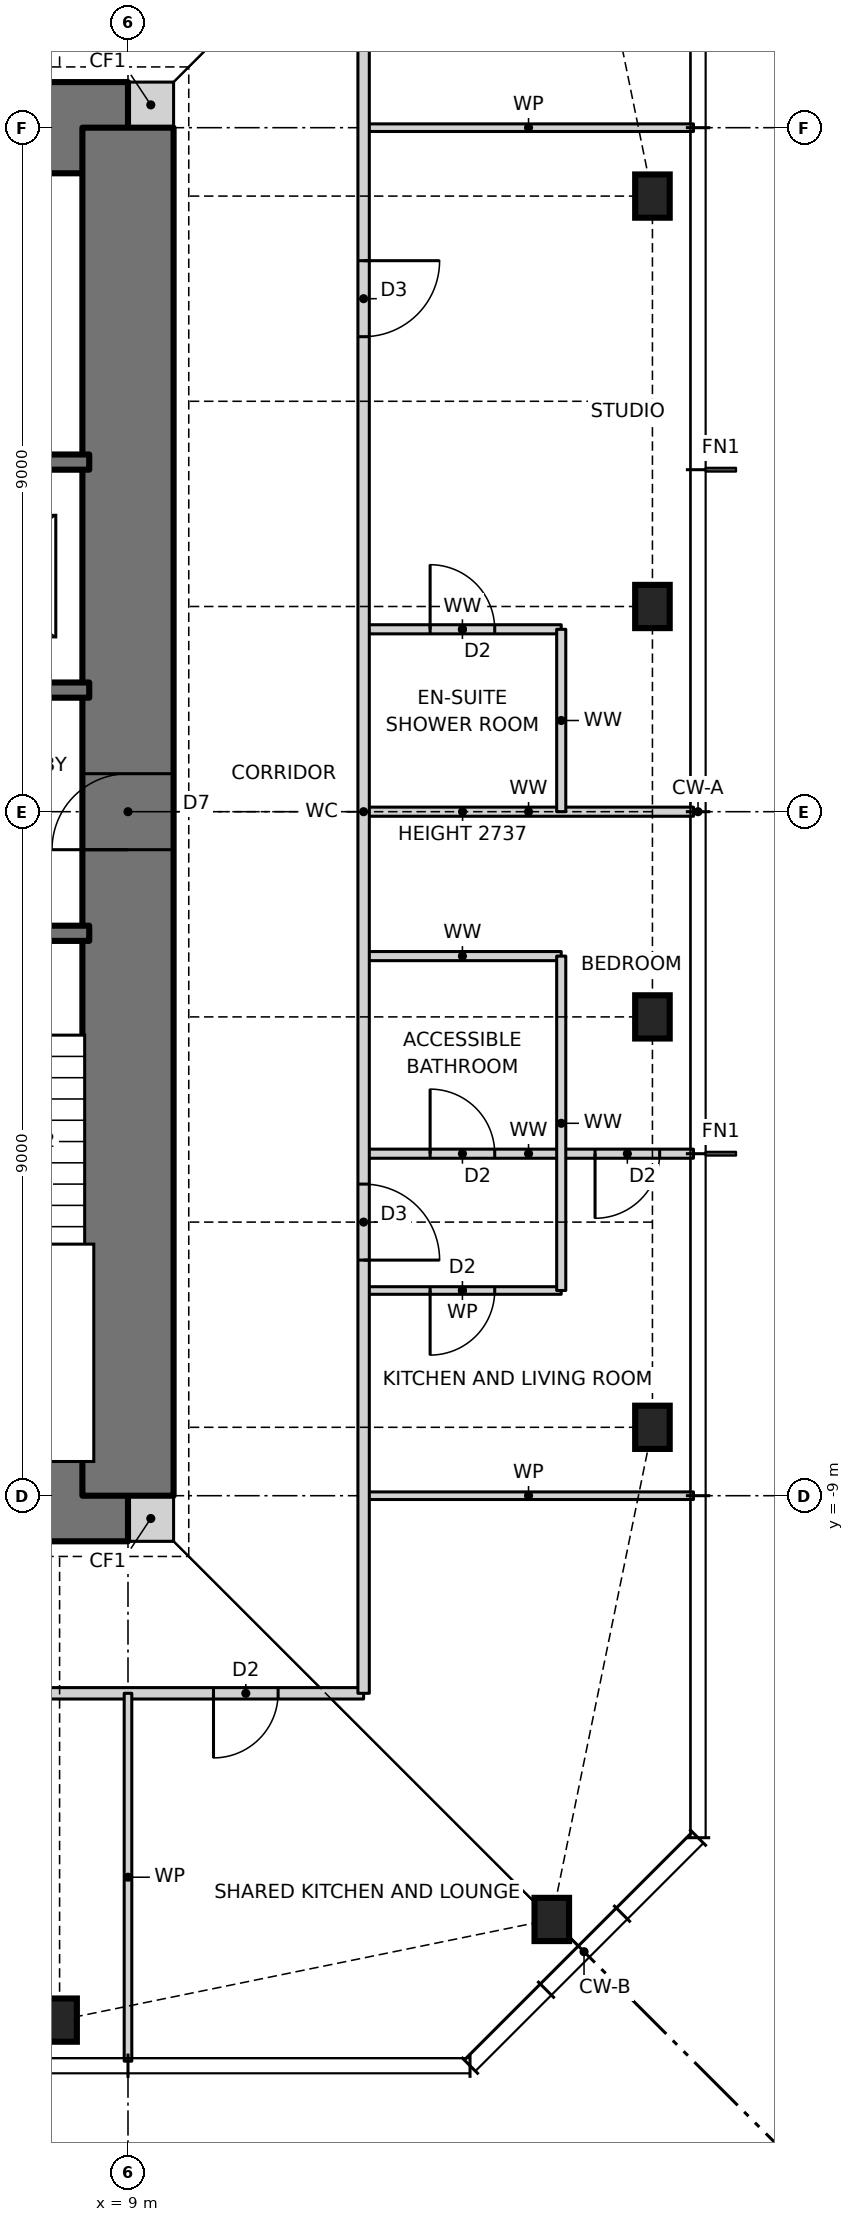
"""IFC4 building model, lengths in metres.
Left out: names, types, materials, properties, quantities, classifications, styles, units other than length and angle.
Written with IfcOpenShell. Run it as: python <this file> out.ifc"""

import sys

from ifc_helpers import new_model, si_unit, direction, frame, frame_2d, origin, origin_2d, place, context, subcontext, project, spatial, rectangle, i_section, extrude, element, fill, save


model = new_model("IFC4")
c1 = context("Model", 3, precision=1e-05, world=origin(), true_north=direction((0.0, 1.0)))
c2 = subcontext(c1, "Body", "Model", "MODEL_VIEW")
j1 = project(units=[si_unit("LENGTHUNIT", "METRE"), si_unit("PLANEANGLEUNIT", "RADIAN")], contexts=[c1])
p1 = place(None, origin())
s1 = spatial("IfcSite", under=j1, at=p1, CompositionType="ELEMENT")
p2 = place(p1, origin())
s2 = spatial("IfcBuilding", under=s1, at=p2, CompositionType="ELEMENT")
p3 = place(p2, frame((0.0, 0.0, 250.0)))
s3 = spatial("IfcBuildingStorey", under=s2, at=p3, CompositionType="ELEMENT", Elevation=250.0)
for number, where, z_axis, x_axis in (
    (1, (8.1, -15.9, 0.0), (0.0, 0.0, 1.0), (1.0, 0.0, 0.0)),
    (2, (14.576, -14.576, 0.0), (0.0, 0.0, 1.0), (1.0, 0.0, 0.0)),
    (3, (15.9, -8.1, 0.0), (0.0, 0.0, 1.0), (1.0, 0.0, 0.0)),
    (4, (15.9, -2.7, 0.0), (0.0, 0.0, 1.0), (1.0, 0.0, 0.0)),
    (5, (15.9, 2.7, 0.0), (0.0, 0.0, 1.0), (1.0, 0.0, 0.0)),
    (6, (15.9, 8.1, 0.0), (0.0, 0.0, 1.0), (1.0, 0.0, 0.0)),
):
    element("IfcColumn", number, at=place(p3, frame(where, z_axis=z_axis, x_axis=x_axis)), inside=s3, PredefinedType="COLUMN", context=c2, shape_type="SweptSolid", body=[
        extrude(i_section(OverallWidth=0.455, OverallDepth=0.569, WebThickness=0.078, FlangeThickness=0.125, at=origin_2d()), origin(), (0.0, 0.0, 1.0), 3.5),
    ])
for number, where, z_axis, x_axis in (
    (7, (9.0, -9.3, 0.0), (0.0, 0.0, 1.0), (1.0, 0.0, 0.0)),
    (8, (9.0, 9.3, 0.0), (0.0, 0.0, 1.0), (1.0, 0.0, 0.0)),
):
    element("IfcWall", number, at=place(p3, frame(where, z_axis=z_axis, x_axis=x_axis)), inside=s3, PredefinedType="SOLIDWALL", context=c2, shape_type="SweptSolid", body=[
        extrude(rectangle(XDim=0.6, YDim=0.6, at=frame_2d((0.3, 0.0))), origin(), (0.0, 0.0, 1.0), 3.5),
    ])
p4 = place(p3, frame((-9.0, -9.0, 0.0), z_axis=(0.0, 0.0, 1.0), x_axis=(1.0, 0.0, 0.0)))
e9 = element("IfcWall", 9, at=p4, inside=s3, PredefinedType="SHEAR", context=c2, shape_type="SweptSolid", body=[
    extrude(rectangle(XDim=18.0, YDim=1.2, at=frame_2d((9.0, 0.0))), origin(), (0.0, 0.0, 1.0), 3.5),
])
p5 = place(p4, frame((3.775, 0.0, 0.0)))
e10 = element("IfcOpeningElement", 10, at=p5, cuts=e9, PredefinedType="OPENING", context=c2, shape_type="SweptSolid", body=[
    extrude(rectangle(XDim=0.9, YDim=2.1, at=frame_2d((0.45, 1.05))), frame((0.0, 0.61, 0.0), z_axis=(0.0, -1.0, 0.0), x_axis=(1.0, 0.0, 0.0)), (0.0, 0.0, 1.0), 1.22),
])
p6 = place(p4, frame((10.625, 0.0, 0.0)))
e11 = element("IfcOpeningElement", 11, at=p6, cuts=e9, PredefinedType="OPENING", context=c2, shape_type="SweptSolid", body=[
    extrude(rectangle(XDim=0.9, YDim=2.1, at=frame_2d((0.45, 1.05))), frame((0.0, 0.61, 0.0), z_axis=(0.0, -1.0, 0.0), x_axis=(1.0, 0.0, 0.0)), (0.0, 0.0, 1.0), 1.22),
])
p7 = place(p3, frame((9.0, 9.0, 0.0), z_axis=(0.0, 0.0, 1.0), x_axis=(-1.0, 0.0, 0.0)))
e12 = element("IfcWall", 12, at=p7, inside=s3, PredefinedType="SHEAR", context=c2, shape_type="SweptSolid", body=[
    extrude(rectangle(XDim=18.0, YDim=1.2, at=frame_2d((9.0, 0.0))), origin(), (0.0, 0.0, 1.0), 3.5),
])
p8 = place(p7, frame((11.125, 0.0, 0.0)))
e13 = element("IfcOpeningElement", 13, at=p8, cuts=e12, PredefinedType="OPENING", context=c2, shape_type="SweptSolid", body=[
    extrude(rectangle(XDim=0.9, YDim=2.1, at=frame_2d((0.45, 1.05))), frame((0.0, 0.61, 0.0), z_axis=(0.0, -1.0, 0.0), x_axis=(1.0, 0.0, 0.0)), (0.0, 0.0, 1.0), 1.22),
])
p9 = place(p7, frame((4.275, 0.0, 0.0)))
e14 = element("IfcOpeningElement", 14, at=p9, cuts=e12, PredefinedType="OPENING", context=c2, shape_type="SweptSolid", body=[
    extrude(rectangle(XDim=0.9, YDim=2.1, at=frame_2d((0.45, 1.05))), frame((0.0, 0.61, 0.0), z_axis=(0.0, -1.0, 0.0), x_axis=(1.0, 0.0, 0.0)), (0.0, 0.0, 1.0), 1.22),
])
p10 = place(p3, frame((9.0, -9.0, 0.0), z_axis=(0.0, 0.0, 1.0), x_axis=(0.0, 1.0, 0.0)))
e15 = element("IfcWall", 15, at=p10, inside=s3, PredefinedType="SHEAR", context=c2, shape_type="SweptSolid", body=[
    extrude(rectangle(XDim=18.0, YDim=1.2, at=frame_2d((9.0, 0.0))), origin(), (0.0, 0.0, 1.0), 3.5),
])
p11 = place(p10, frame((8.5, 0.0, 0.0)))
e16 = element("IfcOpeningElement", 16, at=p11, cuts=e15, PredefinedType="OPENING", context=c2, shape_type="SweptSolid", body=[
    extrude(rectangle(XDim=1.0, YDim=2.1, at=frame_2d((0.5, 1.05))), frame((0.0, 0.61, 0.0), z_axis=(0.0, -1.0, 0.0), x_axis=(1.0, 0.0, 0.0)), (0.0, 0.0, 1.0), 1.22),
])
p12 = place(p3, frame((-11.6, -11.6, 0.0), z_axis=(0.0, 0.0, 1.0), x_axis=(1.0, 0.0, 0.0)))
e17 = element("IfcWall", 17, at=p12, inside=s3, PredefinedType="PARTITIONING", context=c2, shape_type="SweptSolid", body=[
    extrude(rectangle(XDim=23.7, YDim=0.15, at=frame_2d((11.85, 0.0))), origin(), (0.0, 0.0, 1.0), 3.27),
])
p13 = place(p12, frame((4.35, 0.0, 0.0)))
e18 = element("IfcOpeningElement", 18, at=p13, cuts=e17, PredefinedType="OPENING", context=c2, shape_type="SweptSolid", body=[
    extrude(rectangle(XDim=1.0, YDim=2.1, at=frame_2d((0.5, 1.05))), frame((0.0, 0.085, 0.0), z_axis=(0.0, -1.0, 0.0), x_axis=(1.0, 0.0, 0.0)), (0.0, 0.0, 1.0), 0.17),
])
p14 = place(p12, frame((17.85, 0.0, 0.0)))
e19 = element("IfcOpeningElement", 19, at=p14, cuts=e17, PredefinedType="OPENING", context=c2, shape_type="SweptSolid", body=[
    extrude(rectangle(XDim=1.0, YDim=2.1, at=frame_2d((0.5, 1.05))), frame((0.0, 0.085, 0.0), z_axis=(0.0, -1.0, 0.0), x_axis=(1.0, 0.0, 0.0)), (0.0, 0.0, 1.0), 0.17),
])
p15 = place(p12, frame((21.725, 0.0, 0.0)))
e20 = element("IfcOpeningElement", 20, at=p15, cuts=e17, PredefinedType="OPENING", context=c2, shape_type="SweptSolid", body=[
    extrude(rectangle(XDim=0.85, YDim=2.1, at=frame_2d((0.425, 1.05))), frame((0.0, 0.085, 0.0), z_axis=(0.0, -1.0, 0.0), x_axis=(1.0, 0.0, 0.0)), (0.0, 0.0, 1.0), 0.17),
])
p16 = place(p3, frame((12.1, -9.0, 0.0), z_axis=(0.0, 0.0, 1.0), x_axis=(1.0, 0.0, 0.0)))
e21 = element("IfcWall", 21, at=p16, inside=s3, PredefinedType="PARTITIONING", context=c2, shape_type="SweptSolid", body=[
    extrude(rectangle(XDim=4.34, YDim=0.1, at=frame_2d((2.17, 0.0))), origin(), (0.0, 0.0, 1.0), 3.27),
])
p17 = place(p3, frame((12.1, -6.3, 0.0), z_axis=(0.0, 0.0, 1.0), x_axis=(1.0, 0.0, 0.0)))
e22 = element("IfcWall", 22, at=p17, inside=s3, PredefinedType="PARTITIONING", context=c2, shape_type="SweptSolid", body=[
    extrude(rectangle(XDim=2.6, YDim=0.1, at=frame_2d((1.3, 0.0))), origin(), (0.0, 0.0, 1.0), 3.27),
])
p18 = place(p17, frame((0.875, 0.0, 0.0)))
e23 = element("IfcOpeningElement", 23, at=p18, cuts=e22, PredefinedType="OPENING", context=c2, shape_type="SweptSolid", body=[
    extrude(rectangle(XDim=0.85, YDim=2.1, at=frame_2d((0.425, 1.05))), frame((0.0, 0.06, 0.0), z_axis=(0.0, -1.0, 0.0), x_axis=(1.0, 0.0, 0.0)), (0.0, 0.0, 1.0), 0.12),
])
p19 = place(p3, frame((12.1, -4.5, 0.0), z_axis=(0.0, 0.0, 1.0), x_axis=(1.0, 0.0, 0.0)))
e24 = element("IfcWall", 24, at=p19, inside=s3, PredefinedType="PARTITIONING", context=c2, shape_type="SweptSolid", body=[
    extrude(rectangle(XDim=4.34, YDim=0.12, at=frame_2d((2.17, 0.0))), origin(), (0.0, 0.0, 1.0), 3.27),
])
p20 = place(p19, frame((3.045, 0.0, 0.0)))
e25 = element("IfcOpeningElement", 25, at=p20, cuts=e24, PredefinedType="OPENING", context=c2, shape_type="SweptSolid", body=[
    extrude(rectangle(XDim=0.85, YDim=2.1, at=frame_2d((0.425, 1.05))), frame((0.0, 0.07, 0.0), z_axis=(0.0, -1.0, 0.0), x_axis=(1.0, 0.0, 0.0)), (0.0, 0.0, 1.0), 0.14),
])
p21 = place(p19, frame((0.875, 0.0, 0.0)))
e26 = element("IfcOpeningElement", 26, at=p21, cuts=e24, PredefinedType="OPENING", context=c2, shape_type="SweptSolid", body=[
    extrude(rectangle(XDim=0.85, YDim=2.1, at=frame_2d((0.425, 1.05))), frame((0.0, 0.07, 0.0), z_axis=(0.0, -1.0, 0.0), x_axis=(1.0, 0.0, 0.0)), (0.0, 0.0, 1.0), 0.14),
])
p22 = place(p3, frame((12.1, -1.9, 0.0), z_axis=(0.0, 0.0, 1.0), x_axis=(1.0, 0.0, 0.0)))
e27 = element("IfcWall", 27, at=p22, inside=s3, PredefinedType="PARTITIONING", context=c2, shape_type="SweptSolid", body=[
    extrude(rectangle(XDim=2.6, YDim=0.12, at=frame_2d((1.3, 0.0))), origin(), (0.0, 0.0, 1.0), 3.27),
])
p23 = place(p3, frame((-8.49, -1.6, 0.0), z_axis=(0.0, 0.0, 1.0), x_axis=(1.0, 0.0, 0.0)))
e28 = element("IfcWall", 28, at=p23, inside=s3, PredefinedType="SOLIDWALL", context=c2, shape_type="SweptSolid", body=[
    extrude(rectangle(XDim=16.98, YDim=0.2, at=frame_2d((8.49, 0.0))), origin(), (0.0, 0.0, 1.0), 3.5),
])
p24 = place(p23, frame((14.81, 0.0, 0.0)))
e29 = element("IfcOpeningElement", 29, at=p24, cuts=e28, PredefinedType="OPENING", context=c2, shape_type="SweptSolid", body=[
    extrude(rectangle(XDim=1.0, YDim=2.1, at=frame_2d((0.5, 1.05))), frame((0.0, 0.11, 0.0), z_axis=(0.0, -1.0, 0.0), x_axis=(1.0, 0.0, 0.0)), (0.0, 0.0, 1.0), 0.22),
])
p25 = place(p23, frame((1.232, 0.0, 0.0)))
e30 = element("IfcOpeningElement", 30, at=p25, cuts=e28, PredefinedType="OPENING", context=c2, shape_type="SweptSolid", body=[
    extrude(rectangle(XDim=0.9, YDim=2.1, at=frame_2d((0.45, 1.05))), frame((0.0, 0.11, 0.0), z_axis=(0.0, -1.0, 0.0), x_axis=(1.0, 0.0, 0.0)), (0.0, 0.0, 1.0), 0.22),
])
p26 = place(p23, frame((4.627, 0.0, 0.0)))
e31 = element("IfcOpeningElement", 31, at=p26, cuts=e28, PredefinedType="OPENING", context=c2, shape_type="SweptSolid", body=[
    extrude(rectangle(XDim=0.9, YDim=2.1, at=frame_2d((0.45, 1.05))), frame((0.0, 0.11, 0.0), z_axis=(0.0, -1.0, 0.0), x_axis=(1.0, 0.0, 0.0)), (0.0, 0.0, 1.0), 0.22),
])
p27 = place(p23, frame((8.052, 0.0, 0.0)))
e32 = element("IfcOpeningElement", 32, at=p27, cuts=e28, PredefinedType="OPENING", context=c2, shape_type="SweptSolid", body=[
    extrude(rectangle(XDim=0.9, YDim=2.1, at=frame_2d((0.45, 1.05))), frame((0.0, 0.11, 0.0), z_axis=(0.0, -1.0, 0.0), x_axis=(1.0, 0.0, 0.0)), (0.0, 0.0, 1.0), 0.22),
])
p28 = place(p23, frame((12.42, 0.0, 0.0)))
e33 = element("IfcOpeningElement", 33, at=p28, cuts=e28, PredefinedType="OPENING", context=c2, shape_type="SweptSolid", body=[
    extrude(rectangle(XDim=0.9, YDim=2.1, at=frame_2d((0.45, 1.05))), frame((0.0, 0.11, 0.0), z_axis=(0.0, -1.0, 0.0), x_axis=(1.0, 0.0, 0.0)), (0.0, 0.0, 1.0), 0.22),
])
p29 = place(p23, frame((10.707, 0.0, 0.0)))
e34 = element("IfcOpeningElement", 34, at=p29, cuts=e28, PredefinedType="OPENING", context=c2, shape_type="SweptSolid", body=[
    extrude(rectangle(XDim=0.9, YDim=2.1, at=frame_2d((0.45, 1.05))), frame((0.0, 0.11, 0.0), z_axis=(0.0, -1.0, 0.0), x_axis=(1.0, 0.0, 0.0)), (0.0, 0.0, 1.0), 0.22),
])
p30 = place(p3, frame((12.1, 0.0, 0.0), z_axis=(0.0, 0.0, 1.0), x_axis=(1.0, 0.0, 0.0)))
e35 = element("IfcWall", 35, at=p30, inside=s3, PredefinedType="PARTITIONING", context=c2, shape_type="SweptSolid", body=[
    extrude(rectangle(XDim=4.34, YDim=0.12, at=frame_2d((2.17, 0.0))), origin(), (0.0, 0.0, 1.0), 2.737),
])
p31 = place(p3, frame((-8.49, 1.6, 0.0), z_axis=(0.0, 0.0, 1.0), x_axis=(1.0, 0.0, 0.0)))
e36 = element("IfcWall", 36, at=p31, inside=s3, PredefinedType="SOLIDWALL", context=c2, shape_type="SweptSolid", body=[
    extrude(rectangle(XDim=16.98, YDim=0.2, at=frame_2d((8.49, 0.0))), origin(), (0.0, 0.0, 1.0), 3.5),
])
p32 = place(p31, frame((1.17, 0.0, 0.0)))
e37 = element("IfcOpeningElement", 37, at=p32, cuts=e36, PredefinedType="OPENING", context=c2, shape_type="SweptSolid", body=[
    extrude(rectangle(XDim=1.0, YDim=2.1, at=frame_2d((0.5, 1.05))), frame((0.0, 0.11, 0.0), z_axis=(0.0, -1.0, 0.0), x_axis=(1.0, 0.0, 0.0)), (0.0, 0.0, 1.0), 0.22),
])
p33 = place(p31, frame((4.606, 0.0, 0.0)))
e38 = element("IfcOpeningElement", 38, at=p33, cuts=e36, PredefinedType="OPENING", context=c2, shape_type="SweptSolid", body=[
    extrude(rectangle(XDim=0.9, YDim=2.1, at=frame_2d((0.45, 1.05))), frame((0.0, 0.11, 0.0), z_axis=(0.0, -1.0, 0.0), x_axis=(1.0, 0.0, 0.0)), (0.0, 0.0, 1.0), 0.22),
])
p34 = place(p31, frame((8.04, 0.0, 0.0)))
e39 = element("IfcOpeningElement", 39, at=p34, cuts=e36, PredefinedType="OPENING", context=c2, shape_type="SweptSolid", body=[
    extrude(rectangle(XDim=0.9, YDim=2.1, at=frame_2d((0.45, 1.05))), frame((0.0, 0.11, 0.0), z_axis=(0.0, -1.0, 0.0), x_axis=(1.0, 0.0, 0.0)), (0.0, 0.0, 1.0), 0.22),
])
p35 = place(p31, frame((11.374, 0.0, 0.0)))
e40 = element("IfcOpeningElement", 40, at=p35, cuts=e36, PredefinedType="OPENING", context=c2, shape_type="SweptSolid", body=[
    extrude(rectangle(XDim=1.1, YDim=2.1, at=frame_2d((0.55, 1.05))), frame((0.0, 0.11, 0.0), z_axis=(0.0, -1.0, 0.0), x_axis=(1.0, 0.0, 0.0)), (0.0, 0.0, 1.0), 0.22),
])
p36 = place(p31, frame((14.66, 0.0, 0.0)))
e41 = element("IfcOpeningElement", 41, at=p36, cuts=e36, PredefinedType="OPENING", context=c2, shape_type="SweptSolid", body=[
    extrude(rectangle(XDim=1.3, YDim=2.1, at=frame_2d((0.65, 1.05))), frame((0.0, 0.11, 0.0), z_axis=(0.0, -1.0, 0.0), x_axis=(1.0, 0.0, 0.0)), (0.0, 0.0, 1.0), 0.22),
])
p37 = place(p3, frame((12.1, 2.4, 0.0), z_axis=(0.0, 0.0, 1.0), x_axis=(1.0, 0.0, 0.0)))
e42 = element("IfcWall", 42, at=p37, inside=s3, PredefinedType="PARTITIONING", context=c2, shape_type="SweptSolid", body=[
    extrude(rectangle(XDim=2.6, YDim=0.12, at=frame_2d((1.3, 0.0))), origin(), (0.0, 0.0, 1.0), 3.27),
])
p38 = place(p37, frame((0.875, 0.0, 0.0)))
e43 = element("IfcOpeningElement", 43, at=p38, cuts=e42, PredefinedType="OPENING", context=c2, shape_type="SweptSolid", body=[
    extrude(rectangle(XDim=0.85, YDim=2.1, at=frame_2d((0.425, 1.05))), frame((0.0, 0.07, 0.0), z_axis=(0.0, -1.0, 0.0), x_axis=(1.0, 0.0, 0.0)), (0.0, 0.0, 1.0), 0.14),
])
p39 = place(p3, frame((5.15, 4.6, 0.0), z_axis=(0.0, 0.0, 1.0), x_axis=(1.0, 0.0, 0.0)))
e44 = element("IfcWall", 44, at=p39, inside=s3, PredefinedType="SOLIDWALL", context=c2, shape_type="SweptSolid", body=[
    extrude(rectangle(XDim=3.34, YDim=0.2, at=frame_2d((1.67, 0.0))), origin(), (0.0, 0.0, 1.0), 3.5),
])
p40 = place(p3, frame((12.1, 9.0, 0.0), z_axis=(0.0, 0.0, 1.0), x_axis=(1.0, 0.0, 0.0)))
e45 = element("IfcWall", 45, at=p40, inside=s3, PredefinedType="PARTITIONING", context=c2, shape_type="SweptSolid", body=[
    extrude(rectangle(XDim=4.34, YDim=0.1, at=frame_2d((2.17, 0.0))), origin(), (0.0, 0.0, 1.0), 3.27),
])
p41 = place(p3, frame((14.7, -6.3, 0.0), z_axis=(0.0, 0.0, 1.0), x_axis=(0.0, 1.0, 0.0)))
e46 = element("IfcWall", 46, at=p41, inside=s3, PredefinedType="PARTITIONING", context=c2, shape_type="SweptSolid", body=[
    extrude(rectangle(XDim=4.4, YDim=0.12, at=frame_2d((2.2, 0.0))), origin(), (0.0, 0.0, 1.0), 3.27),
])
p42 = place(p3, frame((14.7, 0.0, 0.0), z_axis=(0.0, 0.0, 1.0), x_axis=(0.0, 1.0, 0.0)))
e47 = element("IfcWall", 47, at=p42, inside=s3, PredefinedType="PARTITIONING", context=c2, shape_type="SweptSolid", body=[
    extrude(rectangle(XDim=2.4, YDim=0.12, at=frame_2d((1.2, 0.0))), origin(), (0.0, 0.0, 1.0), 3.27),
])
p43 = place(p3, frame((12.1, -11.6, 0.0), z_axis=(0.0, 0.0, 1.0), x_axis=(0.0, 1.0, 0.0)))
e48 = element("IfcWall", 48, at=p43, inside=s3, PredefinedType="PARTITIONING", context=c2, shape_type="SweptSolid", body=[
    extrude(rectangle(XDim=23.2, YDim=0.15, at=frame_2d((11.6, 0.0))), origin(), (0.0, 0.0, 1.0), 3.27),
])
p44 = place(p43, frame((5.7, 0.0, 0.0)))
e49 = element("IfcOpeningElement", 49, at=p44, cuts=e48, PredefinedType="OPENING", context=c2, shape_type="SweptSolid", body=[
    extrude(rectangle(XDim=1.0, YDim=2.1, at=frame_2d((0.5, 1.05))), frame((0.0, 0.085, 0.0), z_axis=(0.0, -1.0, 0.0), x_axis=(1.0, 0.0, 0.0)), (0.0, 0.0, 1.0), 0.17),
])
p45 = place(p43, frame((17.85, 0.0, 0.0)))
e50 = element("IfcOpeningElement", 50, at=p45, cuts=e48, PredefinedType="OPENING", context=c2, shape_type="SweptSolid", body=[
    extrude(rectangle(XDim=1.0, YDim=2.1, at=frame_2d((0.5, 1.05))), frame((0.0, 0.085, 0.0), z_axis=(0.0, -1.0, 0.0), x_axis=(1.0, 0.0, 0.0)), (0.0, 0.0, 1.0), 0.17),
])
p46 = place(p3, frame((9.0, -16.44, 0.0), z_axis=(0.0, 0.0, 1.0), x_axis=(0.0, 1.0, 0.0)))
e51 = element("IfcWall", 51, at=p46, inside=s3, PredefinedType="PARTITIONING", context=c2, shape_type="SweptSolid", body=[
    extrude(rectangle(XDim=4.84, YDim=0.1, at=frame_2d((2.42, 0.0))), origin(), (0.0, 0.0, 1.0), 3.27),
])
p47 = place(p44, frame((1.0, 0.0, 0.0), z_axis=(0.0, 0.0, 1.0), x_axis=(-1.0, 0.0, 0.0)))
e52 = element("IfcDoor", 52, at=p47, inside=s3, OperationType="SINGLE_SWING_RIGHT", PredefinedType="DOOR", context=c2, shape_type="SweptSolid", body=[
    extrude(rectangle(XDim=1.0, YDim=2.1, at=frame_2d((0.5, 1.05))), frame((0.0, 0.025, 0.0), z_axis=(0.0, -1.0, 0.0), x_axis=(1.0, 0.0, 0.0)), (0.0, 0.0, 1.0), 0.05),
])
fill(e49, e52)
p48 = place(p18, frame((0.85, 0.0, 0.0), z_axis=(0.0, 0.0, 1.0), x_axis=(-1.0, 0.0, 0.0)))
e53 = element("IfcDoor", 53, at=p48, inside=s3, OperationType="SINGLE_SWING_RIGHT", PredefinedType="DOOR", context=c2, shape_type="SweptSolid", body=[
    extrude(rectangle(XDim=0.85, YDim=2.1, at=frame_2d((0.425, 1.05))), frame((0.0, 0.025, 0.0), z_axis=(0.0, -1.0, 0.0), x_axis=(1.0, 0.0, 0.0)), (0.0, 0.0, 1.0), 0.05),
])
fill(e23, e53)
p49 = place(p20, frame((0.85, 0.0, 0.0), z_axis=(0.0, 0.0, 1.0), x_axis=(-1.0, 0.0, 0.0)))
e54 = element("IfcDoor", 54, at=p49, inside=s3, OperationType="SINGLE_SWING_RIGHT", PredefinedType="DOOR", context=c2, shape_type="SweptSolid", body=[
    extrude(rectangle(XDim=0.85, YDim=2.1, at=frame_2d((0.425, 1.05))), frame((0.0, 0.025, 0.0), z_axis=(0.0, -1.0, 0.0), x_axis=(1.0, 0.0, 0.0)), (0.0, 0.0, 1.0), 0.05),
])
fill(e25, e54)
p50 = place(p21, origin())
e55 = element("IfcDoor", 55, at=p50, inside=s3, OperationType="SINGLE_SWING_LEFT", PredefinedType="DOOR", context=c2, shape_type="SweptSolid", body=[
    extrude(rectangle(XDim=0.85, YDim=2.1, at=frame_2d((0.425, 1.05))), frame((0.0, 0.025, 0.0), z_axis=(0.0, -1.0, 0.0), x_axis=(1.0, 0.0, 0.0)), (0.0, 0.0, 1.0), 0.05),
])
fill(e26, e55)
p51 = place(p45, frame((1.0, 0.0, 0.0), z_axis=(0.0, 0.0, 1.0), x_axis=(-1.0, 0.0, 0.0)))
e56 = element("IfcDoor", 56, at=p51, inside=s3, OperationType="SINGLE_SWING_LEFT", PredefinedType="DOOR", context=c2, shape_type="SweptSolid", body=[
    extrude(rectangle(XDim=1.0, YDim=2.1, at=frame_2d((0.5, 1.05))), frame((0.0, 0.025, 0.0), z_axis=(0.0, -1.0, 0.0), x_axis=(1.0, 0.0, 0.0)), (0.0, 0.0, 1.0), 0.05),
])
fill(e50, e56)
p52 = place(p38, origin())
e57 = element("IfcDoor", 57, at=p52, inside=s3, OperationType="SINGLE_SWING_LEFT", PredefinedType="DOOR", context=c2, shape_type="SweptSolid", body=[
    extrude(rectangle(XDim=0.85, YDim=2.1, at=frame_2d((0.425, 1.05))), frame((0.0, 0.025, 0.0), z_axis=(0.0, -1.0, 0.0), x_axis=(1.0, 0.0, 0.0)), (0.0, 0.0, 1.0), 0.05),
])
fill(e43, e57)
p53 = place(p15, frame((0.85, 0.0, 0.0), z_axis=(0.0, 0.0, 1.0), x_axis=(-1.0, 0.0, 0.0)))
e58 = element("IfcDoor", 58, at=p53, inside=s3, OperationType="SINGLE_SWING_RIGHT", PredefinedType="DOOR", context=c2, shape_type="SweptSolid", body=[
    extrude(rectangle(XDim=0.85, YDim=2.1, at=frame_2d((0.425, 1.05))), frame((0.0, 0.025, 0.0), z_axis=(0.0, -1.0, 0.0), x_axis=(1.0, 0.0, 0.0)), (0.0, 0.0, 1.0), 0.05),
])
fill(e20, e58)
p54 = place(p11, origin())
e59 = element("IfcDoor", 59, at=p54, inside=s3, OperationType="SINGLE_SWING_LEFT", PredefinedType="DOOR", context=c2, shape_type="SweptSolid", body=[
    extrude(rectangle(XDim=1.0, YDim=2.1, at=frame_2d((0.5, 1.05))), frame((0.0, 0.025, 0.0), z_axis=(0.0, -1.0, 0.0), x_axis=(1.0, 0.0, 0.0)), (0.0, 0.0, 1.0), 0.05),
])
fill(e16, e59)
save(model, sys.argv[1])
